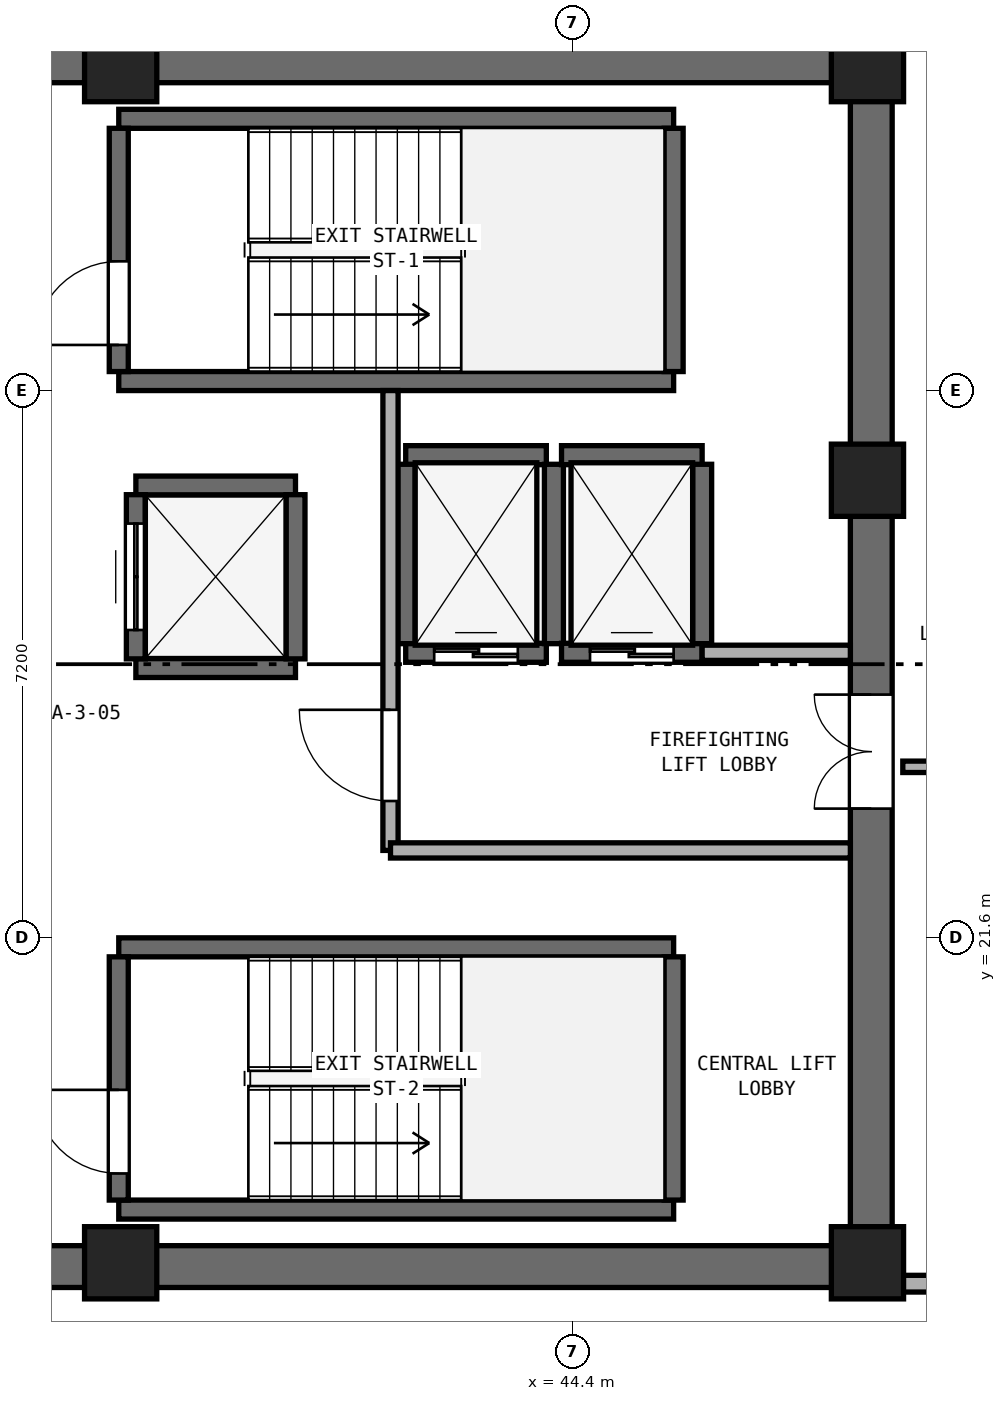
"""IFC4 building model, lengths in metres.
Left out: names, types, materials, properties, quantities, classifications, styles, units other than length and angle.
Written with IfcOpenShell. Run it as: python <this file> out.ifc"""

import sys

from ifc_helpers import new_model, si_unit, direction, frame, frame_2d, origin, origin_2d, place, context, subcontext, project, spatial, rectangle, extrude, element, fill, save


model = new_model("IFC4")
c1 = context("Model", 3, precision=1e-05, world=origin(), true_north=direction((0.0, 1.0)))
c2 = subcontext(c1, "Body", "Model", "MODEL_VIEW")
j1 = project(units=[si_unit("LENGTHUNIT", "METRE"), si_unit("PLANEANGLEUNIT", "RADIAN")], contexts=[c1])
p1 = place(None, origin())
s1 = spatial("IfcSite", under=j1, at=p1, CompositionType="ELEMENT")
p2 = place(p1, origin())
s2 = spatial("IfcBuilding", under=s1, at=p2, CompositionType="ELEMENT")
p3 = place(p2, frame((0.0, 0.0, 155.4)))
s3 = spatial("IfcBuildingStorey", under=s2, at=p3, CompositionType="ELEMENT", Elevation=155.4)
for number, where, z_axis, x_axis in (
    (1, (25.4, 17.275, 0.0), (0.0, 0.0, 1.0), (1.0, 0.0, 0.0)),
    (2, (25.4, 33.125, 0.0), (0.0, 0.0, 1.0), (1.0, 0.0, 0.0)),
):
    element("IfcWall", number, at=place(p3, frame(where, z_axis=z_axis, x_axis=x_axis)), inside=s3, PredefinedType="SHEAR", context=c2, shape_type="SweptSolid", body=[
        extrude(rectangle(XDim=23.2, YDim=0.55, at=frame_2d((11.6, 0.0))), origin(), (0.0, 0.0, 1.0), 3.54),
    ])
p4 = place(p3, frame((48.325, 17.55, 0.0), z_axis=(0.0, 0.0, 1.0), x_axis=(0.0, 1.0, 0.0)))
e3 = element("IfcWall", 3, at=p4, inside=s3, PredefinedType="SHEAR", context=c2, shape_type="SweptSolid", body=[
    extrude(rectangle(XDim=15.3, YDim=0.55, at=frame_2d((7.65, 0.0))), origin(), (0.0, 0.0, 1.0), 3.54),
])
p5 = place(p4, frame((5.75, 0.0, 0.0)))
e4 = element("IfcOpeningElement", 4, at=p5, cuts=e3, PredefinedType="OPENING", context=c2, shape_type="SweptSolid", body=[
    extrude(rectangle(XDim=1.5, YDim=2.15, at=frame_2d((0.75, 1.075))), frame((0.0, 0.285, 0.0), z_axis=(0.0, -1.0, 0.0), x_axis=(1.0, 0.0, 0.0)), (0.0, 0.0, 1.0), 0.57),
])
for number, where, z_axis, x_axis in (
    (5, (38.45, 17.325, 0.0), (0.0, 0.0, 1.0), (1.0, 0.0, 0.0)),
    (6, (48.275, 17.325, 0.0), (0.0, 0.0, 1.0), (1.0, 0.0, 0.0)),
    (7, (48.275, 27.62, 0.0), (0.0, 0.0, 1.0), (1.0, 0.0, 0.0)),
    (8, (48.275, 33.075, 0.0), (0.0, 0.0, 1.0), (1.0, 0.0, 0.0)),
    (9, (38.45, 33.075, 0.0), (0.0, 0.0, 1.0), (1.0, 0.0, 0.0)),
):
    element("IfcColumn", number, at=place(p3, frame(where, z_axis=z_axis, x_axis=x_axis)), inside=s3, PredefinedType="PILASTER", context=c2, shape_type="SweptSolid", body=[
        extrude(rectangle(XDim=0.95, YDim=0.95, at=origin_2d()), origin(), (0.0, 0.0, 1.0), 3.8),
    ])
for number, where, z_axis, x_axis in (
    (10, (38.425, 28.925, 0.0), (0.0, 0.0, 1.0), (1.0, 0.0, 0.0)),
    (11, (38.425, 32.375, 0.0), (0.0, 0.0, 1.0), (1.0, 0.0, 0.0)),
):
    element("IfcWall", number, at=place(p3, frame(where, z_axis=z_axis, x_axis=x_axis)), inside=s3, PredefinedType="SHEAR", context=c2, shape_type="SweptSolid", body=[
        extrude(rectangle(XDim=7.3, YDim=0.25, at=frame_2d((3.65, 0.0))), origin(), (0.0, 0.0, 1.0), 3.54),
    ])
p6 = place(p3, frame((38.425, 29.05, 0.0), z_axis=(0.0, 0.0, 1.0), x_axis=(0.0, 1.0, 0.0)))
e12 = element("IfcWall", 12, at=p6, inside=s3, PredefinedType="SHEAR", context=c2, shape_type="SweptSolid", body=[
    extrude(rectangle(XDim=3.2, YDim=0.25, at=frame_2d((1.6, 0.0))), origin(), (0.0, 0.0, 1.0), 3.54),
])
p7 = place(p6, frame((0.35, 0.0, 0.0)))
e13 = element("IfcOpeningElement", 13, at=p7, cuts=e12, PredefinedType="OPENING", context=c2, shape_type="SweptSolid", body=[
    extrude(rectangle(XDim=1.1, YDim=2.15, at=frame_2d((0.55, 1.075))), frame((0.0, 0.135, 0.0), z_axis=(0.0, -1.0, 0.0), x_axis=(1.0, 0.0, 0.0)), (0.0, 0.0, 1.0), 0.27),
])
p8 = place(p3, frame((45.725, 29.05, 0.0), z_axis=(0.0, 0.0, 1.0), x_axis=(0.0, 1.0, 0.0)))
e14 = element("IfcWall", 14, at=p8, inside=s3, PredefinedType="SHEAR", context=c2, shape_type="SweptSolid", body=[
    extrude(rectangle(XDim=3.2, YDim=0.25, at=frame_2d((1.6, 0.0))), origin(), (0.0, 0.0, 1.0), 3.54),
])
for number, where, z_axis, x_axis in (
    (15, (38.425, 18.025, 0.0), (0.0, 0.0, 1.0), (1.0, 0.0, 0.0)),
    (16, (38.425, 21.475, 0.0), (0.0, 0.0, 1.0), (1.0, 0.0, 0.0)),
):
    element("IfcWall", number, at=place(p3, frame(where, z_axis=z_axis, x_axis=x_axis)), inside=s3, PredefinedType="SHEAR", context=c2, shape_type="SweptSolid", body=[
        extrude(rectangle(XDim=7.3, YDim=0.25, at=frame_2d((3.65, 0.0))), origin(), (0.0, 0.0, 1.0), 3.54),
    ])
p9 = place(p3, frame((38.425, 18.15, 0.0), z_axis=(0.0, 0.0, 1.0), x_axis=(0.0, 1.0, 0.0)))
e17 = element("IfcWall", 17, at=p9, inside=s3, PredefinedType="SHEAR", context=c2, shape_type="SweptSolid", body=[
    extrude(rectangle(XDim=3.2, YDim=0.25, at=frame_2d((1.6, 0.0))), origin(), (0.0, 0.0, 1.0), 3.54),
])
p10 = place(p9, frame((0.35, 0.0, 0.0)))
e18 = element("IfcOpeningElement", 18, at=p10, cuts=e17, PredefinedType="OPENING", context=c2, shape_type="SweptSolid", body=[
    extrude(rectangle(XDim=1.1, YDim=2.15, at=frame_2d((0.55, 1.075))), frame((0.0, 0.135, 0.0), z_axis=(0.0, -1.0, 0.0), x_axis=(1.0, 0.0, 0.0)), (0.0, 0.0, 1.0), 0.27),
])
p11 = place(p3, frame((45.725, 18.15, 0.0), z_axis=(0.0, 0.0, 1.0), x_axis=(0.0, 1.0, 0.0)))
e19 = element("IfcWall", 19, at=p11, inside=s3, PredefinedType="SHEAR", context=c2, shape_type="SweptSolid", body=[
    extrude(rectangle(XDim=3.2, YDim=0.25, at=frame_2d((1.6, 0.0))), origin(), (0.0, 0.0, 1.0), 3.54),
])
p12 = place(p3, frame((42.2, 25.35, 0.0), z_axis=(0.0, 0.0, 1.0), x_axis=(1.0, 0.0, 0.0)))
e20 = element("IfcWall", 20, at=p12, inside=s3, PredefinedType="SHEAR", context=c2, shape_type="SweptSolid", body=[
    extrude(rectangle(XDim=1.85, YDim=0.25, at=frame_2d((0.925, 0.0))), origin(), (0.0, 0.0, 1.0), 3.54),
])
p13 = place(p12, frame((0.375, 0.0, 0.0)))
e21 = element("IfcOpeningElement", 21, at=p13, cuts=e20, PredefinedType="OPENING", context=c2, shape_type="SweptSolid", body=[
    extrude(rectangle(XDim=1.1, YDim=2.15, at=frame_2d((0.55, 1.075))), frame((0.0, 0.135, 0.0), z_axis=(0.0, -1.0, 0.0), x_axis=(1.0, 0.0, 0.0)), (0.0, 0.0, 1.0), 0.27),
])
p14 = place(p3, frame((42.2, 27.95, 0.0), z_axis=(0.0, 0.0, 1.0), x_axis=(1.0, 0.0, 0.0)))
e22 = element("IfcWall", 22, at=p14, inside=s3, PredefinedType="SHEAR", context=c2, shape_type="SweptSolid", body=[
    extrude(rectangle(XDim=1.85, YDim=0.25, at=frame_2d((0.925, 0.0))), origin(), (0.0, 0.0, 1.0), 3.54),
])
for number, where, z_axis, x_axis in (
    (23, (42.2, 25.47, 0.0), (0.0, 0.0, 1.0), (0.0, 1.0, 0.0)),
    (24, (44.15, 25.47, 0.0), (0.0, 0.0, 1.0), (0.0, 1.0, 0.0)),
):
    element("IfcWall", number, at=place(p3, frame(where, z_axis=z_axis, x_axis=x_axis)), inside=s3, PredefinedType="SHEAR", context=c2, shape_type="SweptSolid", body=[
        extrude(rectangle(XDim=2.36, YDim=0.25, at=frame_2d((1.18, 0.0))), origin(), (0.0, 0.0, 1.0), 3.54),
    ])
p15 = place(p3, frame((44.25, 25.35, 0.0), z_axis=(0.0, 0.0, 1.0), x_axis=(1.0, 0.0, 0.0)))
e25 = element("IfcWall", 25, at=p15, inside=s3, PredefinedType="SHEAR", context=c2, shape_type="SweptSolid", body=[
    extrude(rectangle(XDim=1.85, YDim=0.25, at=frame_2d((0.925, 0.0))), origin(), (0.0, 0.0, 1.0), 3.54),
])
p16 = place(p15, frame((0.375, 0.0, 0.0)))
e26 = element("IfcOpeningElement", 26, at=p16, cuts=e25, PredefinedType="OPENING", context=c2, shape_type="SweptSolid", body=[
    extrude(rectangle(XDim=1.1, YDim=2.15, at=frame_2d((0.55, 1.075))), frame((0.0, 0.135, 0.0), z_axis=(0.0, -1.0, 0.0), x_axis=(1.0, 0.0, 0.0)), (0.0, 0.0, 1.0), 0.27),
])
p17 = place(p3, frame((44.25, 27.95, 0.0), z_axis=(0.0, 0.0, 1.0), x_axis=(1.0, 0.0, 0.0)))
e27 = element("IfcWall", 27, at=p17, inside=s3, PredefinedType="SHEAR", context=c2, shape_type="SweptSolid", body=[
    extrude(rectangle(XDim=1.85, YDim=0.25, at=frame_2d((0.925, 0.0))), origin(), (0.0, 0.0, 1.0), 3.54),
])
p18 = place(p3, frame((46.1, 25.47, 0.0), z_axis=(0.0, 0.0, 1.0), x_axis=(0.0, 1.0, 0.0)))
e28 = element("IfcWall", 28, at=p18, inside=s3, PredefinedType="SHEAR", context=c2, shape_type="SweptSolid", body=[
    extrude(rectangle(XDim=2.36, YDim=0.25, at=frame_2d((1.18, 0.0))), origin(), (0.0, 0.0, 1.0), 3.54),
])
for number, where, z_axis, x_axis in (
    (29, (38.65, 25.15, 0.0), (0.0, 0.0, 1.0), (1.0, 0.0, 0.0)),
    (30, (38.65, 27.55, 0.0), (0.0, 0.0, 1.0), (1.0, 0.0, 0.0)),
):
    element("IfcWall", number, at=place(p3, frame(where, z_axis=z_axis, x_axis=x_axis)), inside=s3, PredefinedType="SHEAR", context=c2, shape_type="SweptSolid", body=[
        extrude(rectangle(XDim=2.1, YDim=0.25, at=frame_2d((1.05, 0.0))), origin(), (0.0, 0.0, 1.0), 3.54),
    ])
p19 = place(p3, frame((38.65, 25.27, 0.0), z_axis=(0.0, 0.0, 1.0), x_axis=(0.0, 1.0, 0.0)))
e31 = element("IfcWall", 31, at=p19, inside=s3, PredefinedType="SHEAR", context=c2, shape_type="SweptSolid", body=[
    extrude(rectangle(XDim=2.16, YDim=0.25, at=frame_2d((1.08, 0.0))), origin(), (0.0, 0.0, 1.0), 3.54),
])
p20 = place(p19, frame((0.38, 0.0, 0.0)))
e32 = element("IfcOpeningElement", 32, at=p20, cuts=e31, PredefinedType="OPENING", context=c2, shape_type="SweptSolid", body=[
    extrude(rectangle(XDim=1.4, YDim=2.2, at=frame_2d((0.7, 1.1))), frame((0.0, 0.135, 0.0), z_axis=(0.0, -1.0, 0.0), x_axis=(1.0, 0.0, 0.0)), (0.0, 0.0, 1.0), 0.27),
])
p21 = place(p3, frame((40.75, 25.27, 0.0), z_axis=(0.0, 0.0, 1.0), x_axis=(0.0, 1.0, 0.0)))
e33 = element("IfcWall", 33, at=p21, inside=s3, PredefinedType="SHEAR", context=c2, shape_type="SweptSolid", body=[
    extrude(rectangle(XDim=2.16, YDim=0.25, at=frame_2d((1.08, 0.0))), origin(), (0.0, 0.0, 1.0), 3.54),
])
p22 = place(p3, frame((42.0, 22.75, 0.0), z_axis=(0.0, 0.0, 1.0), x_axis=(0.0, 1.0, 0.0)))
e34 = element("IfcWall", 34, at=p22, inside=s3, PredefinedType="SOLIDWALL", context=c2, shape_type="SweptSolid", body=[
    extrude(rectangle(XDim=6.05, YDim=0.2, at=frame_2d((3.025, 0.0))), origin(), (0.0, 0.0, 1.0), 3.54),
])
p23 = place(p22, frame((0.65, 0.0, 0.0)))
e35 = element("IfcOpeningElement", 35, at=p23, cuts=e34, PredefinedType="OPENING", context=c2, shape_type="SweptSolid", body=[
    extrude(rectangle(XDim=1.2, YDim=2.15, at=frame_2d((0.6, 1.075))), frame((0.0, 0.11, 0.0), z_axis=(0.0, -1.0, 0.0), x_axis=(1.0, 0.0, 0.0)), (0.0, 0.0, 1.0), 0.22),
])
p24 = place(p3, frame((42.0, 22.75, 0.0), z_axis=(0.0, 0.0, 1.0), x_axis=(1.0, 0.0, 0.0)))
e36 = element("IfcWall", 36, at=p24, inside=s3, PredefinedType="SOLIDWALL", context=c2, shape_type="SweptSolid", body=[
    extrude(rectangle(XDim=6.05, YDim=0.2, at=frame_2d((3.025, 0.0))), origin(), (0.0, 0.0, 1.0), 3.54),
])
p25 = place(p3, frame((46.1, 25.35, 0.0), z_axis=(0.0, 0.0, 1.0), x_axis=(1.0, 0.0, 0.0)))
e37 = element("IfcWall", 37, at=p25, inside=s3, PredefinedType="SOLIDWALL", context=c2, shape_type="SweptSolid", body=[
    extrude(rectangle(XDim=1.95, YDim=0.2, at=frame_2d((0.975, 0.0))), origin(), (0.0, 0.0, 1.0), 3.54),
])
p26 = place(p3, frame((48.74, 17.05, 0.0), z_axis=(0.0, 0.0, 1.0), x_axis=(1.0, 0.0, 0.0)))
e38 = element("IfcWall", 38, at=p26, inside=s3, PredefinedType="PARTITIONING", context=c2, shape_type="SweptSolid", body=[
    extrude(rectangle(XDim=1.51, YDim=0.22, at=frame_2d((0.755, 0.0))), origin(), (0.0, 0.0, 1.0), 2.923),
])
p27 = place(p3, frame((48.74, 23.85, 0.0), z_axis=(0.0, 0.0, 1.0), x_axis=(1.0, 0.0, 0.0)))
e39 = element("IfcWall", 39, at=p27, inside=s3, PredefinedType="PARTITIONING", context=c2, shape_type="SweptSolid", body=[
    extrude(rectangle(XDim=12.855, YDim=0.15, at=frame_2d((6.427, 0.0))), origin(), (0.0, 0.0, 1.0), 3.54),
])
p28 = place(p27, frame((5.978, 0.0, 0.0)))
e40 = element("IfcOpeningElement", 40, at=p28, cuts=e39, PredefinedType="OPENING", context=c2, shape_type="SweptSolid", body=[
    extrude(rectangle(XDim=0.9, YDim=2.1, at=frame_2d((0.45, 1.05))), frame((0.0, 0.085, 0.0), z_axis=(0.0, -1.0, 0.0), x_axis=(1.0, 0.0, 0.0)), (0.0, 0.0, 1.0), 0.17),
])
p29 = place(p7, origin())
e41 = element("IfcDoor", 41, at=p29, inside=s3, OperationType="SINGLE_SWING_LEFT", PredefinedType="DOOR", context=c2, shape_type="SweptSolid", body=[
    extrude(rectangle(XDim=1.1, YDim=2.15, at=frame_2d((0.55, 1.075))), frame((0.0, 0.025, 0.0), z_axis=(0.0, -1.0, 0.0), x_axis=(1.0, 0.0, 0.0)), (0.0, 0.0, 1.0), 0.05),
])
fill(e13, e41)
p30 = place(p10, origin())
e42 = element("IfcDoor", 42, at=p30, inside=s3, OperationType="SINGLE_SWING_RIGHT", PredefinedType="DOOR", context=c2, shape_type="SweptSolid", body=[
    extrude(rectangle(XDim=1.1, YDim=2.15, at=frame_2d((0.55, 1.075))), frame((0.0, 0.025, 0.0), z_axis=(0.0, -1.0, 0.0), x_axis=(1.0, 0.0, 0.0)), (0.0, 0.0, 1.0), 0.05),
])
fill(e18, e42)
p31 = place(p13, origin())
e43 = element("IfcDoor", 43, at=p31, inside=s3, OperationType="DOUBLE_DOOR_SLIDING", PredefinedType="DOOR", context=c2, shape_type="SweptSolid", body=[
    extrude(rectangle(XDim=1.1, YDim=2.15, at=frame_2d((0.55, 1.075))), frame((0.0, 0.025, 0.0), z_axis=(0.0, -1.0, 0.0), x_axis=(1.0, 0.0, 0.0)), (0.0, 0.0, 1.0), 0.05),
])
fill(e21, e43)
p32 = place(p16, origin())
e44 = element("IfcDoor", 44, at=p32, inside=s3, OperationType="DOUBLE_DOOR_SLIDING", PredefinedType="DOOR", context=c2, shape_type="SweptSolid", body=[
    extrude(rectangle(XDim=1.1, YDim=2.15, at=frame_2d((0.55, 1.075))), frame((0.0, 0.025, 0.0), z_axis=(0.0, -1.0, 0.0), x_axis=(1.0, 0.0, 0.0)), (0.0, 0.0, 1.0), 0.05),
])
fill(e26, e44)
p33 = place(p20, origin())
e45 = element("IfcDoor", 45, at=p33, inside=s3, OperationType="DOUBLE_DOOR_SLIDING", PredefinedType="DOOR", context=c2, shape_type="SweptSolid", body=[
    extrude(rectangle(XDim=1.4, YDim=2.2, at=frame_2d((0.7, 1.1))), frame((0.0, 0.025, 0.0), z_axis=(0.0, -1.0, 0.0), x_axis=(1.0, 0.0, 0.0)), (0.0, 0.0, 1.0), 0.05),
])
fill(e32, e45)
p34 = place(p23, origin())
e46 = element("IfcDoor", 46, at=p34, inside=s3, OperationType="SINGLE_SWING_RIGHT", PredefinedType="DOOR", context=c2, shape_type="SweptSolid", body=[
    extrude(rectangle(XDim=1.2, YDim=2.15, at=frame_2d((0.6, 1.075))), frame((0.0, 0.025, 0.0), z_axis=(0.0, -1.0, 0.0), x_axis=(1.0, 0.0, 0.0)), (0.0, 0.0, 1.0), 0.05),
])
fill(e35, e46)
p35 = place(p5, origin())
e47 = element("IfcDoor", 47, at=p35, inside=s3, OperationType="DOUBLE_DOOR_SINGLE_SWING", PredefinedType="DOOR", context=c2, shape_type="SweptSolid", body=[
    extrude(rectangle(XDim=1.5, YDim=2.15, at=frame_2d((0.75, 1.075))), frame((0.0, 0.025, 0.0), z_axis=(0.0, -1.0, 0.0), x_axis=(1.0, 0.0, 0.0)), (0.0, 0.0, 1.0), 0.05),
])
fill(e4, e47)
save(model, sys.argv[1])
